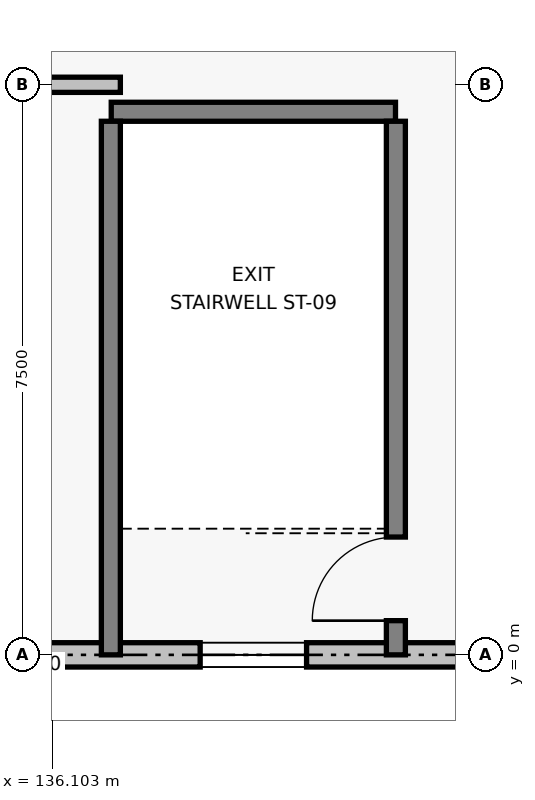
"""IFC4 building model, lengths in metres.
Left out: names, types, materials, properties, quantities, classifications, styles, units other than length and angle.
Written with IfcOpenShell. Run it as: python <this file> out.ifc"""

import sys

from ifc_helpers import new_model, si_unit, direction, frame, frame_2d, origin, place, context, subcontext, project, spatial, rectangle, extrude, element, fill, save


model = new_model("IFC4")
c1 = context("Model", 3, precision=1e-05, world=origin(), true_north=direction((0.0, 1.0)))
c2 = subcontext(c1, "Body", "Model", "MODEL_VIEW")
j1 = project(units=[si_unit("LENGTHUNIT", "METRE"), si_unit("PLANEANGLEUNIT", "RADIAN")], contexts=[c1])
p1 = place(None, origin())
s1 = spatial("IfcSite", under=j1, at=p1, CompositionType="ELEMENT")
p2 = place(p1, origin())
s2 = spatial("IfcBuilding", under=s1, at=p2, CompositionType="ELEMENT")
p3 = place(p2, frame((0.0, 0.0, 9.0)))
s3 = spatial("IfcBuildingStorey", under=s2, at=p3, CompositionType="ELEMENT", Elevation=9.0)
p4 = place(p3, frame((135.325, 0.0, 0.0), z_axis=(0.0, 0.0, 1.0), x_axis=(1.0, 0.0, 0.0)))
e1 = element("IfcWall", 1, at=p4, inside=s3, PredefinedType="SOLIDWALL", context=c2, shape_type="SweptSolid", body=[
    extrude(rectangle(XDim=6.85, YDim=0.32, at=frame_2d((3.425, 0.0))), origin(), (0.0, 0.0, 1.0), 3.12),
])
p5 = place(p4, frame((2.725, 0.0, 0.6)))
e2 = element("IfcOpeningElement", 2, at=p5, cuts=e1, PredefinedType="OPENING", context=c2, shape_type="SweptSolid", body=[
    extrude(rectangle(XDim=1.4, YDim=1.8, at=frame_2d((0.7, 0.9))), frame((0.0, 0.17, 0.0), z_axis=(0.0, -1.0, 0.0), x_axis=(1.0, 0.0, 0.0)), (0.0, 0.0, 1.0), 0.34),
])
p6 = place(p3, frame((136.88, 7.145, 0.0), z_axis=(0.0, 0.0, 1.0), x_axis=(1.0, 0.0, 0.0)))
e3 = element("IfcWall", 3, at=p6, inside=s3, PredefinedType="SOLIDWALL", context=c2, shape_type="SweptSolid", body=[
    extrude(rectangle(XDim=3.74, YDim=0.25, at=frame_2d((1.87, 0.0))), origin(), (0.0, 0.0, 1.0), 3.92),
])
p7 = place(p3, frame((136.875, 0.0, 0.0), z_axis=(0.0, 0.0, 1.0), x_axis=(0.0, 1.0, 0.0)))
e4 = element("IfcWall", 4, at=p7, inside=s3, PredefinedType="SOLIDWALL", context=c2, shape_type="SweptSolid", body=[
    extrude(rectangle(XDim=7.02, YDim=0.25, at=frame_2d((3.51, 0.0))), origin(), (0.0, 0.0, 1.0), 3.92),
])
p8 = place(p3, frame((140.625, 0.0, 0.0), z_axis=(0.0, 0.0, 1.0), x_axis=(0.0, 1.0, 0.0)))
e5 = element("IfcWall", 5, at=p8, inside=s3, PredefinedType="SOLIDWALL", context=c2, shape_type="SweptSolid", body=[
    extrude(rectangle(XDim=7.02, YDim=0.25, at=frame_2d((3.51, 0.0))), origin(), (0.0, 0.0, 1.0), 3.92),
])
p9 = place(p8, frame((0.45, 0.0, 0.0)))
e6 = element("IfcOpeningElement", 6, at=p9, cuts=e5, PredefinedType="OPENING", context=c2, shape_type="SweptSolid", body=[
    extrude(rectangle(XDim=1.1, YDim=2.15, at=frame_2d((0.55, 1.075))), frame((0.0, 0.135, 0.0), z_axis=(0.0, -1.0, 0.0), x_axis=(1.0, 0.0, 0.0)), (0.0, 0.0, 1.0), 0.27),
])
p10 = place(p3, frame((135.324, 7.5, 0.0), z_axis=(0.0, 0.0, 1.0), x_axis=(1.0, 0.0, 0.0)))
e7 = element("IfcWall", 7, at=p10, inside=s3, PredefinedType="PARTITIONING", context=c2, shape_type="SweptSolid", body=[
    extrude(rectangle(XDim=1.676, YDim=0.2, at=frame_2d((0.838, 0.0))), origin(), (0.0, 0.0, 1.0), 3.02),
])
p11 = place(p5, origin())
e8 = element("IfcWindow", 8, at=p11, inside=s3, PartitioningType="SINGLE_PANEL", PredefinedType="WINDOW", context=c2, shape_type="SweptSolid", body=[
    extrude(rectangle(XDim=1.4, YDim=1.8, at=frame_2d((0.7, 0.9))), frame((0.0, 0.03, 0.0), z_axis=(0.0, -1.0, 0.0), x_axis=(1.0, 0.0, 0.0)), (0.0, 0.0, 1.0), 0.06),
])
fill(e2, e8)
p12 = place(p9, origin())
e9 = element("IfcDoor", 9, at=p12, inside=s3, OperationType="SINGLE_SWING_LEFT", PredefinedType="DOOR", context=c2, shape_type="SweptSolid", body=[
    extrude(rectangle(XDim=1.1, YDim=2.15, at=frame_2d((0.55, 1.075))), frame((0.0, 0.025, 0.0), z_axis=(0.0, -1.0, 0.0), x_axis=(1.0, 0.0, 0.0)), (0.0, 0.0, 1.0), 0.05),
])
fill(e6, e9)
save(model, sys.argv[1])
